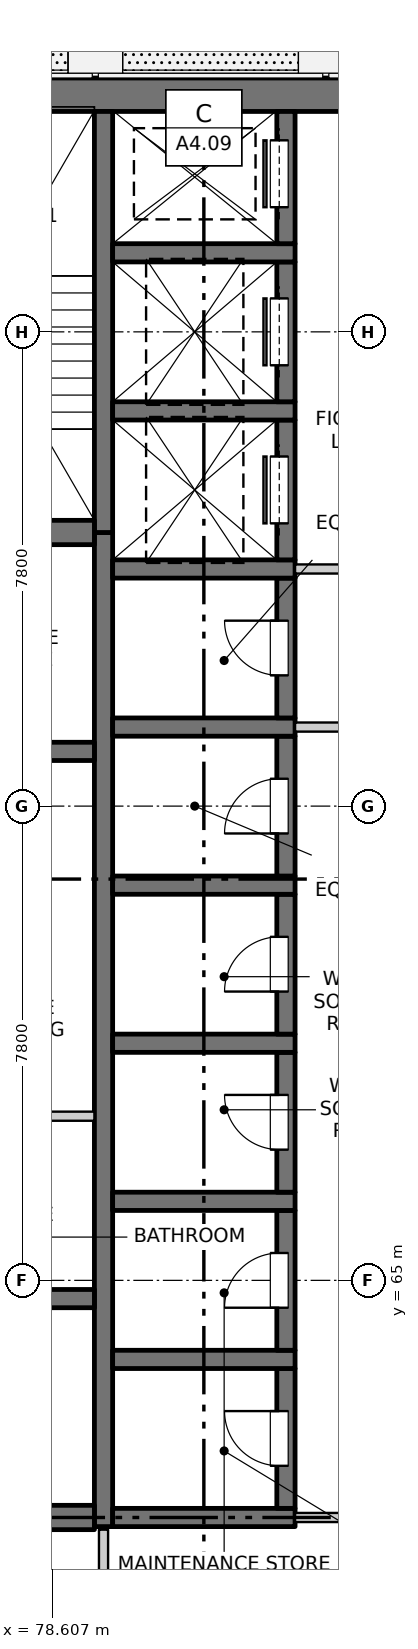
"""IFC4 building model, lengths in metres.
Left out: names, types, materials, properties, quantities, classifications, styles, units other than length and angle.
Written with IfcOpenShell. Run it as: python <this file> out.ifc"""

import sys

from ifc_helpers import new_model, si_unit, direction, frame, frame_2d, origin, place, context, subcontext, project, spatial, rectangle, extrude, element, fill, save


model = new_model("IFC4")
c1 = context("Model", 3, precision=1e-05, world=origin(), true_north=direction((0.0, 1.0)))
c2 = subcontext(c1, "Body", "Model", "MODEL_VIEW")
j1 = project(units=[si_unit("LENGTHUNIT", "METRE"), si_unit("PLANEANGLEUNIT", "RADIAN")], contexts=[c1])
p1 = place(None, origin())
s1 = spatial("IfcSite", under=j1, at=p1, CompositionType="ELEMENT")
p2 = place(p1, origin())
s2 = spatial("IfcBuilding", under=s1, at=p2, CompositionType="ELEMENT")
p3 = place(p2, frame((0.0, 0.0, 182.6)))
s3 = spatial("IfcBuildingStorey", under=s2, at=p3, CompositionType="ELEMENT", Elevation=182.6)
p4 = place(p3, frame((75.525, 84.5, -0.25), z_axis=(0.0, 0.0, 1.0), x_axis=(1.0, 0.0, 0.0)))
e1 = element("IfcWall", 1, at=p4, inside=s3, PredefinedType="SOLIDWALL", context=c2, shape_type="SweptSolid", body=[
    extrude(rectangle(XDim=18.95, YDim=0.55, at=frame_2d((9.475, 0.0))), origin(), (0.0, 0.0, 1.0), 3.4),
])
p5 = place(p3, frame((79.45, 60.95, -0.25), z_axis=(0.0, 0.0, 1.0), x_axis=(0.0, 1.0, 0.0)))
e2 = element("IfcWall", 2, at=p5, inside=s3, PredefinedType="SOLIDWALL", context=c2, shape_type="SweptSolid", body=[
    extrude(rectangle(XDim=16.35, YDim=0.3, at=frame_2d((8.175, 0.0))), origin(), (0.0, 0.0, 1.0), 3.4),
])
p6 = place(p3, frame((79.45, 77.3, -0.25), z_axis=(0.0, 0.0, 1.0), x_axis=(0.0, 1.0, 0.0)))
e3 = element("IfcWall", 3, at=p6, inside=s3, PredefinedType="SOLIDWALL", context=c2, shape_type="SweptSolid", body=[
    extrude(rectangle(XDim=6.925, YDim=0.3, at=frame_2d((3.462, 0.0))), origin(), (0.0, 0.0, 1.0), 3.4),
])
p7 = place(p3, frame((79.6, 61.1, -0.25), z_axis=(0.0, 0.0, 1.0), x_axis=(1.0, 0.0, 0.0)))
e4 = element("IfcWall", 4, at=p7, inside=s3, PredefinedType="SOLIDWALL", context=c2, shape_type="SweptSolid", body=[
    extrude(rectangle(XDim=3.0, YDim=0.3, at=frame_2d((1.5, 0.0))), origin(), (0.0, 0.0, 1.0), 3.4),
])
p8 = place(p3, frame((82.45, 61.25, -0.25), z_axis=(0.0, 0.0, 1.0), x_axis=(0.0, 1.0, 0.0)))
e5 = element("IfcWall", 5, at=p8, inside=s3, PredefinedType="SOLIDWALL", context=c2, shape_type="SweptSolid", body=[
    extrude(rectangle(XDim=2.3, YDim=0.3, at=frame_2d((1.15, 0.0))), origin(), (0.0, 0.0, 1.0), 3.4),
])
p9 = place(p8, frame((0.7, 0.0, 0.25)))
e6 = element("IfcOpeningElement", 6, at=p9, cuts=e5, PredefinedType="OPENING", context=c2, shape_type="SweptSolid", body=[
    extrude(rectangle(XDim=0.9, YDim=2.1, at=frame_2d((0.45, 1.05))), frame((0.0, 0.16, 0.0), z_axis=(0.0, -1.0, 0.0), x_axis=(1.0, 0.0, 0.0)), (0.0, 0.0, 1.0), 0.32),
])
p10 = place(p3, frame((79.6, 63.7, -0.25), z_axis=(0.0, 0.0, 1.0), x_axis=(1.0, 0.0, 0.0)))
e7 = element("IfcWall", 7, at=p10, inside=s3, PredefinedType="SOLIDWALL", context=c2, shape_type="SweptSolid", body=[
    extrude(rectangle(XDim=3.0, YDim=0.3, at=frame_2d((1.5, 0.0))), origin(), (0.0, 0.0, 1.0), 3.4),
])
p11 = place(p3, frame((82.45, 63.85, -0.25), z_axis=(0.0, 0.0, 1.0), x_axis=(0.0, 1.0, 0.0)))
e8 = element("IfcWall", 8, at=p11, inside=s3, PredefinedType="SOLIDWALL", context=c2, shape_type="SweptSolid", body=[
    extrude(rectangle(XDim=2.3, YDim=0.3, at=frame_2d((1.15, 0.0))), origin(), (0.0, 0.0, 1.0), 3.4),
])
p12 = place(p11, frame((0.7, 0.0, 0.25)))
e9 = element("IfcOpeningElement", 9, at=p12, cuts=e8, PredefinedType="OPENING", context=c2, shape_type="SweptSolid", body=[
    extrude(rectangle(XDim=0.9, YDim=2.1, at=frame_2d((0.45, 1.05))), frame((0.0, 0.16, 0.0), z_axis=(0.0, -1.0, 0.0), x_axis=(1.0, 0.0, 0.0)), (0.0, 0.0, 1.0), 0.32),
])
p13 = place(p3, frame((79.6, 66.3, -0.25), z_axis=(0.0, 0.0, 1.0), x_axis=(1.0, 0.0, 0.0)))
e10 = element("IfcWall", 10, at=p13, inside=s3, PredefinedType="SOLIDWALL", context=c2, shape_type="SweptSolid", body=[
    extrude(rectangle(XDim=3.0, YDim=0.3, at=frame_2d((1.5, 0.0))), origin(), (0.0, 0.0, 1.0), 3.4),
])
p14 = place(p3, frame((82.45, 66.45, -0.25), z_axis=(0.0, 0.0, 1.0), x_axis=(0.0, 1.0, 0.0)))
e11 = element("IfcWall", 11, at=p14, inside=s3, PredefinedType="SOLIDWALL", context=c2, shape_type="SweptSolid", body=[
    extrude(rectangle(XDim=2.3, YDim=0.3, at=frame_2d((1.15, 0.0))), origin(), (0.0, 0.0, 1.0), 3.4),
])
p15 = place(p14, frame((0.7, 0.0, 0.25)))
e12 = element("IfcOpeningElement", 12, at=p15, cuts=e11, PredefinedType="OPENING", context=c2, shape_type="SweptSolid", body=[
    extrude(rectangle(XDim=0.9, YDim=2.1, at=frame_2d((0.45, 1.05))), frame((0.0, 0.16, 0.0), z_axis=(0.0, -1.0, 0.0), x_axis=(1.0, 0.0, 0.0)), (0.0, 0.0, 1.0), 0.32),
])
p16 = place(p3, frame((79.6, 68.9, -0.25), z_axis=(0.0, 0.0, 1.0), x_axis=(1.0, 0.0, 0.0)))
e13 = element("IfcWall", 13, at=p16, inside=s3, PredefinedType="SOLIDWALL", context=c2, shape_type="SweptSolid", body=[
    extrude(rectangle(XDim=3.0, YDim=0.3, at=frame_2d((1.5, 0.0))), origin(), (0.0, 0.0, 1.0), 3.4),
])
p17 = place(p3, frame((82.45, 69.05, -0.25), z_axis=(0.0, 0.0, 1.0), x_axis=(0.0, 1.0, 0.0)))
e14 = element("IfcWall", 14, at=p17, inside=s3, PredefinedType="SOLIDWALL", context=c2, shape_type="SweptSolid", body=[
    extrude(rectangle(XDim=2.3, YDim=0.3, at=frame_2d((1.15, 0.0))), origin(), (0.0, 0.0, 1.0), 3.4),
])
p18 = place(p17, frame((0.7, 0.0, 0.25)))
e15 = element("IfcOpeningElement", 15, at=p18, cuts=e14, PredefinedType="OPENING", context=c2, shape_type="SweptSolid", body=[
    extrude(rectangle(XDim=0.9, YDim=2.1, at=frame_2d((0.45, 1.05))), frame((0.0, 0.16, 0.0), z_axis=(0.0, -1.0, 0.0), x_axis=(1.0, 0.0, 0.0)), (0.0, 0.0, 1.0), 0.32),
])
p19 = place(p3, frame((79.6, 71.5, -0.25), z_axis=(0.0, 0.0, 1.0), x_axis=(1.0, 0.0, 0.0)))
e16 = element("IfcWall", 16, at=p19, inside=s3, PredefinedType="SOLIDWALL", context=c2, shape_type="SweptSolid", body=[
    extrude(rectangle(XDim=3.0, YDim=0.3, at=frame_2d((1.5, 0.0))), origin(), (0.0, 0.0, 1.0), 3.4),
])
p20 = place(p3, frame((82.45, 71.65, -0.25), z_axis=(0.0, 0.0, 1.0), x_axis=(0.0, 1.0, 0.0)))
e17 = element("IfcWall", 17, at=p20, inside=s3, PredefinedType="SOLIDWALL", context=c2, shape_type="SweptSolid", body=[
    extrude(rectangle(XDim=2.3, YDim=0.3, at=frame_2d((1.15, 0.0))), origin(), (0.0, 0.0, 1.0), 3.4),
])
p21 = place(p20, frame((0.7, 0.0, 0.25)))
e18 = element("IfcOpeningElement", 18, at=p21, cuts=e17, PredefinedType="OPENING", context=c2, shape_type="SweptSolid", body=[
    extrude(rectangle(XDim=0.9, YDim=2.1, at=frame_2d((0.45, 1.05))), frame((0.0, 0.16, 0.0), z_axis=(0.0, -1.0, 0.0), x_axis=(1.0, 0.0, 0.0)), (0.0, 0.0, 1.0), 0.32),
])
p22 = place(p3, frame((79.6, 74.1, -0.25), z_axis=(0.0, 0.0, 1.0), x_axis=(1.0, 0.0, 0.0)))
e19 = element("IfcWall", 19, at=p22, inside=s3, PredefinedType="SOLIDWALL", context=c2, shape_type="SweptSolid", body=[
    extrude(rectangle(XDim=3.0, YDim=0.3, at=frame_2d((1.5, 0.0))), origin(), (0.0, 0.0, 1.0), 3.4),
])
p23 = place(p3, frame((82.45, 74.25, -0.25), z_axis=(0.0, 0.0, 1.0), x_axis=(0.0, 1.0, 0.0)))
e20 = element("IfcWall", 20, at=p23, inside=s3, PredefinedType="SOLIDWALL", context=c2, shape_type="SweptSolid", body=[
    extrude(rectangle(XDim=2.3, YDim=0.3, at=frame_2d((1.15, 0.0))), origin(), (0.0, 0.0, 1.0), 3.4),
])
p24 = place(p23, frame((0.7, 0.0, 0.25)))
e21 = element("IfcOpeningElement", 21, at=p24, cuts=e20, PredefinedType="OPENING", context=c2, shape_type="SweptSolid", body=[
    extrude(rectangle(XDim=0.9, YDim=2.1, at=frame_2d((0.45, 1.05))), frame((0.0, 0.16, 0.0), z_axis=(0.0, -1.0, 0.0), x_axis=(1.0, 0.0, 0.0)), (0.0, 0.0, 1.0), 0.32),
])
p25 = place(p3, frame((79.6, 76.7, -0.25), z_axis=(0.0, 0.0, 1.0), x_axis=(1.0, 0.0, 0.0)))
e22 = element("IfcWall", 22, at=p25, inside=s3, PredefinedType="SOLIDWALL", context=c2, shape_type="SweptSolid", body=[
    extrude(rectangle(XDim=3.0, YDim=0.3, at=frame_2d((1.5, 0.0))), origin(), (0.0, 0.0, 1.0), 3.4),
])
p26 = place(p3, frame((82.45, 76.85, -0.25), z_axis=(0.0, 0.0, 1.0), x_axis=(0.0, 1.0, 0.0)))
e23 = element("IfcWall", 23, at=p26, inside=s3, PredefinedType="SOLIDWALL", context=c2, shape_type="SweptSolid", body=[
    extrude(rectangle(XDim=2.3, YDim=0.3, at=frame_2d((1.15, 0.0))), origin(), (0.0, 0.0, 1.0), 3.4),
])
p27 = place(p26, frame((0.6, 0.0, 0.25)))
e24 = element("IfcOpeningElement", 24, at=p27, cuts=e23, PredefinedType="OPENING", context=c2, shape_type="SweptSolid", body=[
    extrude(rectangle(XDim=1.1, YDim=2.1, at=frame_2d((0.55, 1.05))), frame((0.0, 0.16, 0.0), z_axis=(0.0, -1.0, 0.0), x_axis=(1.0, 0.0, 0.0)), (0.0, 0.0, 1.0), 0.32),
])
p28 = place(p3, frame((79.6, 79.3, -0.25), z_axis=(0.0, 0.0, 1.0), x_axis=(1.0, 0.0, 0.0)))
e25 = element("IfcWall", 25, at=p28, inside=s3, PredefinedType="SOLIDWALL", context=c2, shape_type="SweptSolid", body=[
    extrude(rectangle(XDim=3.0, YDim=0.3, at=frame_2d((1.5, 0.0))), origin(), (0.0, 0.0, 1.0), 3.4),
])
p29 = place(p3, frame((82.45, 79.45, -0.25), z_axis=(0.0, 0.0, 1.0), x_axis=(0.0, 1.0, 0.0)))
e26 = element("IfcWall", 26, at=p29, inside=s3, PredefinedType="SOLIDWALL", context=c2, shape_type="SweptSolid", body=[
    extrude(rectangle(XDim=2.3, YDim=0.3, at=frame_2d((1.15, 0.0))), origin(), (0.0, 0.0, 1.0), 3.4),
])
p30 = place(p29, frame((0.6, 0.0, 0.25)))
e27 = element("IfcOpeningElement", 27, at=p30, cuts=e26, PredefinedType="OPENING", context=c2, shape_type="SweptSolid", body=[
    extrude(rectangle(XDim=1.1, YDim=2.1, at=frame_2d((0.55, 1.05))), frame((0.0, 0.16, 0.0), z_axis=(0.0, -1.0, 0.0), x_axis=(1.0, 0.0, 0.0)), (0.0, 0.0, 1.0), 0.32),
])
p31 = place(p3, frame((79.6, 81.9, -0.25), z_axis=(0.0, 0.0, 1.0), x_axis=(1.0, 0.0, 0.0)))
e28 = element("IfcWall", 28, at=p31, inside=s3, PredefinedType="SOLIDWALL", context=c2, shape_type="SweptSolid", body=[
    extrude(rectangle(XDim=3.0, YDim=0.3, at=frame_2d((1.5, 0.0))), origin(), (0.0, 0.0, 1.0), 3.4),
])
p32 = place(p3, frame((82.45, 82.05, -0.25), z_axis=(0.0, 0.0, 1.0), x_axis=(0.0, 1.0, 0.0)))
e29 = element("IfcWall", 29, at=p32, inside=s3, PredefinedType="SOLIDWALL", context=c2, shape_type="SweptSolid", body=[
    extrude(rectangle(XDim=2.175, YDim=0.3, at=frame_2d((1.087, 0.0))), origin(), (0.0, 0.0, 1.0), 3.4),
])
p33 = place(p32, frame((0.6, 0.0, 0.25)))
e30 = element("IfcOpeningElement", 30, at=p33, cuts=e29, PredefinedType="OPENING", context=c2, shape_type="SweptSolid", body=[
    extrude(rectangle(XDim=1.1, YDim=2.1, at=frame_2d((0.55, 1.05))), frame((0.0, 0.16, 0.0), z_axis=(0.0, -1.0, 0.0), x_axis=(1.0, 0.0, 0.0)), (0.0, 0.0, 1.0), 0.32),
])
p34 = place(p3, frame((75.525, 61.1, -0.25), z_axis=(0.0, 0.0, 1.0), x_axis=(1.0, 0.0, 0.0)))
e31 = element("IfcWall", 31, at=p34, inside=s3, PredefinedType="SOLIDWALL", context=c2, shape_type="SweptSolid", body=[
    extrude(rectangle(XDim=3.775, YDim=0.4, at=frame_2d((1.888, 0.0))), origin(), (0.0, 0.0, 1.0), 3.4),
])
for number, where, z_axis, x_axis in (
    (32, (75.525, 64.7, -0.25), (0.0, 0.0, 1.0), (1.0, 0.0, 0.0)),
    (33, (75.525, 73.7, -0.25), (0.0, 0.0, 1.0), (1.0, 0.0, 0.0)),
):
    element("IfcWall", number, at=place(p3, frame(where, z_axis=z_axis, x_axis=x_axis)), inside=s3, PredefinedType="SOLIDWALL", context=c2, shape_type="SweptSolid", body=[
        extrude(rectangle(XDim=3.775, YDim=0.3, at=frame_2d((1.888, 0.0))), origin(), (0.0, 0.0, 1.0), 3.4),
    ])
p35 = place(p3, frame((75.525, 77.3, -0.25), z_axis=(0.0, 0.0, 1.0), x_axis=(1.0, 0.0, 0.0)))
e34 = element("IfcWall", 34, at=p35, inside=s3, PredefinedType="SOLIDWALL", context=c2, shape_type="SweptSolid", body=[
    extrude(rectangle(XDim=3.775, YDim=0.4, at=frame_2d((1.888, 0.0))), origin(), (0.0, 0.0, 1.0), 3.4),
])
p36 = place(p3, frame((82.6, 61.1, 0.0), z_axis=(0.0, 0.0, 1.0), x_axis=(1.0, 0.0, 0.0)))
e35 = element("IfcWall", 35, at=p36, inside=s3, PredefinedType="PARTITIONING", context=c2, shape_type="SweptSolid", body=[
    extrude(rectangle(XDim=4.8, YDim=0.15, at=frame_2d((2.4, 0.0))), origin(), (0.0, 0.0, 1.0), 3.15),
])
p37 = place(p36, frame((1.5, 0.0, 0.0)))
e36 = element("IfcOpeningElement", 36, at=p37, cuts=e35, PredefinedType="OPENING", context=c2, shape_type="SweptSolid", body=[
    extrude(rectangle(XDim=1.8, YDim=2.1, at=frame_2d((0.9, 1.05))), frame((0.0, 0.085, 0.0), z_axis=(0.0, -1.0, 0.0), x_axis=(1.0, 0.0, 0.0)), (0.0, 0.0, 1.0), 0.17),
])
p38 = place(p3, frame((75.525, 67.7, 0.0), z_axis=(0.0, 0.0, 1.0), x_axis=(1.0, 0.0, 0.0)))
e37 = element("IfcWall", 37, at=p38, inside=s3, PredefinedType="PARTITIONING", context=c2, shape_type="SweptSolid", body=[
    extrude(rectangle(XDim=3.775, YDim=0.15, at=frame_2d((1.887, 0.0))), origin(), (0.0, 0.0, 1.0), 3.15),
])
p39 = place(p3, frame((82.6, 74.1, 0.0), z_axis=(0.0, 0.0, 1.0), x_axis=(1.0, 0.0, 0.0)))
e38 = element("IfcWall", 38, at=p39, inside=s3, PredefinedType="PARTITIONING", context=c2, shape_type="SweptSolid", body=[
    extrude(rectangle(XDim=4.8, YDim=0.15, at=frame_2d((2.4, 0.0))), origin(), (0.0, 0.0, 1.0), 3.15),
])
p40 = place(p39, frame((1.5, 0.0, 0.0)))
e39 = element("IfcOpeningElement", 39, at=p40, cuts=e38, PredefinedType="OPENING", context=c2, shape_type="SweptSolid", body=[
    extrude(rectangle(XDim=1.8, YDim=2.1, at=frame_2d((0.9, 1.05))), frame((0.0, 0.085, 0.0), z_axis=(0.0, -1.0, 0.0), x_axis=(1.0, 0.0, 0.0)), (0.0, 0.0, 1.0), 0.17),
])
p41 = place(p3, frame((82.6, 76.7, 0.0), z_axis=(0.0, 0.0, 1.0), x_axis=(1.0, 0.0, 0.0)))
e40 = element("IfcWall", 40, at=p41, inside=s3, PredefinedType="PARTITIONING", context=c2, shape_type="SweptSolid", body=[
    extrude(rectangle(XDim=4.8, YDim=0.15, at=frame_2d((2.4, 0.0))), origin(), (0.0, 0.0, 1.0), 3.15),
])
p42 = place(p41, frame((1.5, 0.0, 0.0)))
e41 = element("IfcOpeningElement", 41, at=p42, cuts=e40, PredefinedType="OPENING", context=c2, shape_type="SweptSolid", body=[
    extrude(rectangle(XDim=1.8, YDim=2.1, at=frame_2d((0.9, 1.05))), frame((0.0, 0.085, 0.0), z_axis=(0.0, -1.0, 0.0), x_axis=(1.0, 0.0, 0.0)), (0.0, 0.0, 1.0), 0.17),
])
p43 = place(p3, frame((79.45, 55.525, 0.0), z_axis=(0.0, 0.0, 1.0), x_axis=(0.0, 1.0, 0.0)))
e42 = element("IfcWall", 42, at=p43, inside=s3, PredefinedType="PARTITIONING", context=c2, shape_type="SweptSolid", body=[
    extrude(rectangle(XDim=5.375, YDim=0.15, at=frame_2d((2.688, 0.0))), origin(), (0.0, 0.0, 1.0), 3.15),
])
p44 = place(p43, frame((2.175, 0.0, 0.0)))
e43 = element("IfcOpeningElement", 43, at=p44, cuts=e42, PredefinedType="OPENING", context=c2, shape_type="SweptSolid", body=[
    extrude(rectangle(XDim=0.9, YDim=2.1, at=frame_2d((0.45, 1.05))), frame((0.0, 0.085, 0.0), z_axis=(0.0, -1.0, 0.0), x_axis=(1.0, 0.0, 0.0)), (0.0, 0.0, 1.0), 0.17),
])
p45 = place(p9, origin())
e44 = element("IfcDoor", 44, at=p45, inside=s3, OperationType="SINGLE_SWING_RIGHT", PredefinedType="DOOR", context=c2, shape_type="SweptSolid", body=[
    extrude(rectangle(XDim=0.9, YDim=2.1, at=frame_2d((0.45, 1.05))), frame((0.0, 0.135, 0.0), z_axis=(0.0, -1.0, 0.0), x_axis=(1.0, 0.0, 0.0)), (0.0, 0.0, 1.0), 0.05),
])
fill(e6, e44)
p46 = place(p12, origin())
e45 = element("IfcDoor", 45, at=p46, inside=s3, OperationType="SINGLE_SWING_LEFT", PredefinedType="DOOR", context=c2, shape_type="SweptSolid", body=[
    extrude(rectangle(XDim=0.9, YDim=2.1, at=frame_2d((0.45, 1.05))), frame((0.0, 0.135, 0.0), z_axis=(0.0, -1.0, 0.0), x_axis=(1.0, 0.0, 0.0)), (0.0, 0.0, 1.0), 0.05),
])
fill(e9, e45)
p47 = place(p15, origin())
e46 = element("IfcDoor", 46, at=p47, inside=s3, OperationType="SINGLE_SWING_RIGHT", PredefinedType="DOOR", context=c2, shape_type="SweptSolid", body=[
    extrude(rectangle(XDim=0.9, YDim=2.1, at=frame_2d((0.45, 1.05))), frame((0.0, 0.135, 0.0), z_axis=(0.0, -1.0, 0.0), x_axis=(1.0, 0.0, 0.0)), (0.0, 0.0, 1.0), 0.05),
])
fill(e12, e46)
p48 = place(p18, origin())
e47 = element("IfcDoor", 47, at=p48, inside=s3, OperationType="SINGLE_SWING_LEFT", PredefinedType="DOOR", context=c2, shape_type="SweptSolid", body=[
    extrude(rectangle(XDim=0.9, YDim=2.1, at=frame_2d((0.45, 1.05))), frame((0.0, 0.135, 0.0), z_axis=(0.0, -1.0, 0.0), x_axis=(1.0, 0.0, 0.0)), (0.0, 0.0, 1.0), 0.05),
])
fill(e15, e47)
p49 = place(p21, origin())
e48 = element("IfcDoor", 48, at=p49, inside=s3, OperationType="SINGLE_SWING_LEFT", PredefinedType="DOOR", context=c2, shape_type="SweptSolid", body=[
    extrude(rectangle(XDim=0.9, YDim=2.1, at=frame_2d((0.45, 1.05))), frame((0.0, 0.135, 0.0), z_axis=(0.0, -1.0, 0.0), x_axis=(1.0, 0.0, 0.0)), (0.0, 0.0, 1.0), 0.05),
])
fill(e18, e48)
p50 = place(p24, origin())
e49 = element("IfcDoor", 49, at=p50, inside=s3, OperationType="SINGLE_SWING_RIGHT", PredefinedType="DOOR", context=c2, shape_type="SweptSolid", body=[
    extrude(rectangle(XDim=0.9, YDim=2.1, at=frame_2d((0.45, 1.05))), frame((0.0, 0.135, 0.0), z_axis=(0.0, -1.0, 0.0), x_axis=(1.0, 0.0, 0.0)), (0.0, 0.0, 1.0), 0.05),
])
fill(e21, e49)
p51 = place(p27, origin())
e50 = element("IfcDoor", 50, at=p51, inside=s3, OperationType="SLIDING_TO_LEFT", PredefinedType="DOOR", context=c2, shape_type="SweptSolid", body=[
    extrude(rectangle(XDim=1.1, YDim=2.1, at=frame_2d((0.55, 1.05))), frame((0.0, 0.135, 0.0), z_axis=(0.0, -1.0, 0.0), x_axis=(1.0, 0.0, 0.0)), (0.0, 0.0, 1.0), 0.05),
])
fill(e24, e50)
p52 = place(p30, origin())
e51 = element("IfcDoor", 51, at=p52, inside=s3, OperationType="SLIDING_TO_LEFT", PredefinedType="DOOR", context=c2, shape_type="SweptSolid", body=[
    extrude(rectangle(XDim=1.1, YDim=2.1, at=frame_2d((0.55, 1.05))), frame((0.0, 0.135, 0.0), z_axis=(0.0, -1.0, 0.0), x_axis=(1.0, 0.0, 0.0)), (0.0, 0.0, 1.0), 0.05),
])
fill(e27, e51)
p53 = place(p33, origin())
e52 = element("IfcDoor", 52, at=p53, inside=s3, OperationType="SLIDING_TO_RIGHT", PredefinedType="DOOR", context=c2, shape_type="SweptSolid", body=[
    extrude(rectangle(XDim=1.1, YDim=2.1, at=frame_2d((0.55, 1.05))), frame((0.0, 0.135, 0.0), z_axis=(0.0, -1.0, 0.0), x_axis=(1.0, 0.0, 0.0)), (0.0, 0.0, 1.0), 0.05),
])
fill(e30, e52)
save(model, sys.argv[1])
